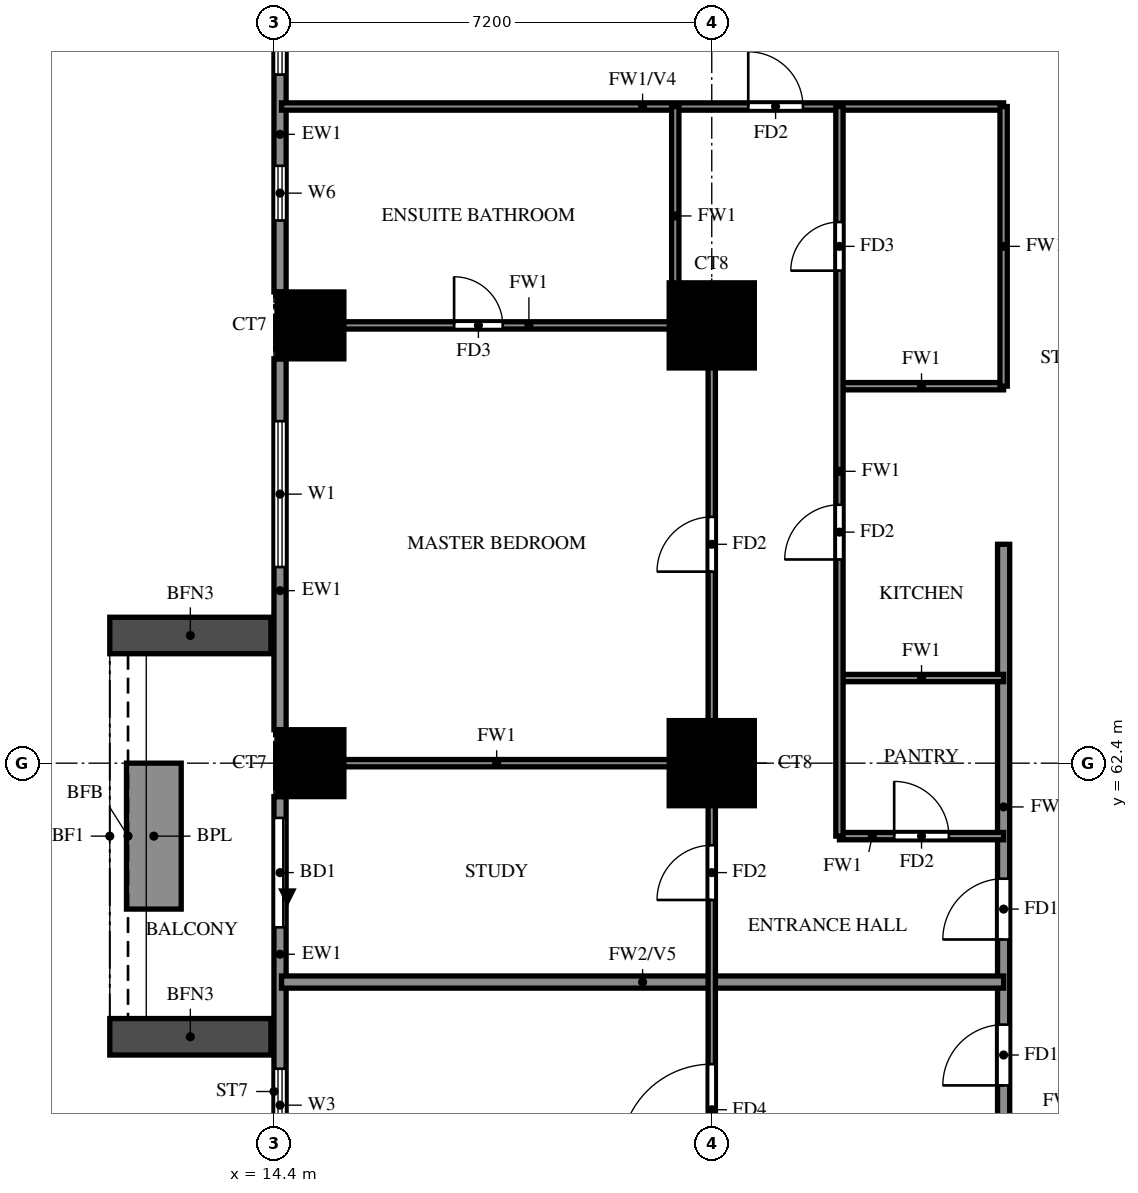
"""IFC4 building model, lengths in metres.
Left out: names, types, materials, properties, quantities, classifications, styles, units other than length and angle.
Written with IfcOpenShell. Run it as: python <this file> out.ifc"""

import sys

from ifc_helpers import new_model, si_unit, direction, frame, frame_2d, origin, origin_2d, place, context, subcontext, project, spatial, rectangle, extrude, source, transform, mapped, element, fill, save


model = new_model("IFC4")
c1 = context("Model", 3, precision=1e-05, world=origin(), true_north=direction((0.0, 1.0)))
c2 = subcontext(c1, "Body", "Model", "MODEL_VIEW")
j1 = project(units=[si_unit("LENGTHUNIT", "METRE"), si_unit("PLANEANGLEUNIT", "RADIAN")], contexts=[c1])
p1 = place(None, origin())
s1 = spatial("IfcSite", under=j1, at=p1, CompositionType="ELEMENT")
p2 = place(p1, origin())
s2 = spatial("IfcBuilding", under=s1, at=p2, CompositionType="ELEMENT")
p3 = place(p2, frame((0.0, 0.0, 44.5)))
s3 = spatial("IfcBuildingStorey", under=s2, at=p3, CompositionType="ELEMENT", Elevation=44.5)
m1 = source(origin(), c2, "Body", "SweptSolid", [
    extrude(rectangle(XDim=1.1, YDim=1.1, at=origin_2d()), origin(), (0.0, 0.0, 1.0), 3.18),
])
p4 = place(p3, frame((15.0, 62.4, 0.0), z_axis=(0.0, 0.0, 1.0), x_axis=(1.0, 0.0, 0.0)))
e1 = element("IfcColumn", 1, at=p4, inside=s3, PredefinedType="COLUMN", context=c2, shape_type="MappedRepresentation", body=[
    mapped(m1, transform((0.0, 0.0, 0.0))),
])
m2 = source(origin(), c2, "Body", "SweptSolid", [
    extrude(rectangle(XDim=1.4, YDim=1.4, at=origin_2d()), origin(), (0.0, 0.0, 1.0), 3.18),
])
p5 = place(p3, frame((21.6, 62.4, 0.0), z_axis=(0.0, 0.0, 1.0), x_axis=(1.0, 0.0, 0.0)))
e2 = element("IfcColumn", 2, at=p5, inside=s3, PredefinedType="COLUMN", context=c2, shape_type="MappedRepresentation", body=[
    mapped(m2, transform((0.0, 0.0, 0.0))),
])
p6 = place(p3, frame((15.0, 69.6, 0.0), z_axis=(0.0, 0.0, 1.0), x_axis=(1.0, 0.0, 0.0)))
e3 = element("IfcColumn", 3, at=p6, inside=s3, PredefinedType="COLUMN", context=c2, shape_type="MappedRepresentation", body=[
    mapped(m1, transform((0.0, 0.0, 0.0))),
])
p7 = place(p3, frame((21.6, 69.6, 0.0), z_axis=(0.0, 0.0, 1.0), x_axis=(1.0, 0.0, 0.0)))
e4 = element("IfcColumn", 4, at=p7, inside=s3, PredefinedType="COLUMN", context=c2, shape_type="MappedRepresentation", body=[
    mapped(m2, transform((0.0, 0.0, 0.0))),
])
p8 = place(p3, frame((14.5, 76.25, 0.0), z_axis=(0.0, 0.0, 1.0), x_axis=(0.0, -1.0, 0.0)))
e5 = element("IfcWall", 5, at=p8, inside=s3, PredefinedType="SOLIDWALL", context=c2, shape_type="SweptSolid", body=[
    extrude(rectangle(XDim=6.1, YDim=0.2, at=frame_2d((3.05, 0.0))), origin(), (0.0, 0.0, 1.0), 3.18),
])
p9 = place(p8, frame((4.025, 0.0, 1.5)))
e6 = element("IfcOpeningElement", 6, at=p9, cuts=e5, PredefinedType="OPENING", context=c2, shape_type="SweptSolid", body=[
    extrude(rectangle(XDim=0.9, YDim=0.9, at=frame_2d((0.45, 0.45))), frame((0.0, 0.11, 0.0), z_axis=(0.0, -1.0, 0.0), x_axis=(1.0, 0.0, 0.0)), (0.0, 0.0, 1.0), 0.22),
])
p10 = place(p8, frame((0.725, 0.0, 0.6)))
e7 = element("IfcOpeningElement", 7, at=p10, cuts=e5, PredefinedType="OPENING", context=c2, shape_type="SweptSolid", body=[
    extrude(rectangle(XDim=1.8, YDim=2.4, at=frame_2d((0.9, 1.2))), frame((0.0, 0.11, 0.0), z_axis=(0.0, -1.0, 0.0), x_axis=(1.0, 0.0, 0.0)), (0.0, 0.0, 1.0), 0.22),
])
p11 = place(p3, frame((14.5, 69.05, 0.0), z_axis=(0.0, 0.0, 1.0), x_axis=(0.0, -1.0, 0.0)))
e8 = element("IfcWall", 8, at=p11, inside=s3, PredefinedType="SOLIDWALL", context=c2, shape_type="SweptSolid", body=[
    extrude(rectangle(XDim=6.1, YDim=0.2, at=frame_2d((3.05, 0.0))), origin(), (0.0, 0.0, 1.0), 3.18),
])
p12 = place(p11, frame((1.025, 0.0, 0.6)))
e9 = element("IfcOpeningElement", 9, at=p12, cuts=e8, PredefinedType="OPENING", context=c2, shape_type="SweptSolid", body=[
    extrude(rectangle(XDim=2.4, YDim=2.4, at=frame_2d((1.2, 1.2))), frame((0.0, 0.11, 0.0), z_axis=(0.0, -1.0, 0.0), x_axis=(1.0, 0.0, 0.0)), (0.0, 0.0, 1.0), 0.22),
])
p13 = place(p3, frame((14.5, 61.85, 0.0), z_axis=(0.0, 0.0, 1.0), x_axis=(0.0, -1.0, 0.0)))
e10 = element("IfcWall", 10, at=p13, inside=s3, PredefinedType="SOLIDWALL", context=c2, shape_type="SweptSolid", body=[
    extrude(rectangle(XDim=6.1, YDim=0.2, at=frame_2d((3.05, 0.0))), origin(), (0.0, 0.0, 1.0), 3.18),
])
p14 = place(p13, frame((0.35, 0.0, 0.0)))
e11 = element("IfcOpeningElement", 11, at=p14, cuts=e10, PredefinedType="OPENING", context=c2, shape_type="SweptSolid", body=[
    extrude(rectangle(XDim=1.8, YDim=2.4, at=frame_2d((0.9, 1.2))), frame((0.0, 0.11, 0.0), z_axis=(0.0, -1.0, 0.0), x_axis=(1.0, 0.0, 0.0)), (0.0, 0.0, 1.0), 0.22),
])
p15 = place(p13, frame((4.475, 0.0, 0.6)))
e12 = element("IfcOpeningElement", 12, at=p15, cuts=e10, PredefinedType="OPENING", context=c2, shape_type="SweptSolid", body=[
    extrude(rectangle(XDim=1.2, YDim=2.4, at=frame_2d((0.6, 1.2))), frame((0.0, 0.11, 0.0), z_axis=(0.0, -1.0, 0.0), x_axis=(1.0, 0.0, 0.0)), (0.0, 0.0, 1.0), 0.22),
])
for number, where, z_axis, x_axis in (
    (13, (14.35, 64.5, 0.0), (0.0, 0.0, 1.0), (-1.0, 0.0, 0.0)),
    (14, (14.35, 57.9, 0.0), (0.0, 0.0, 1.0), (-1.0, 0.0, 0.0)),
):
    element("IfcWall", number, at=place(p3, frame(where, z_axis=z_axis, x_axis=x_axis)), inside=s3, PredefinedType="SOLIDWALL", context=c2, shape_type="SweptSolid", body=[
        extrude(rectangle(XDim=2.65, YDim=0.6, at=frame_2d((1.325, 0.0))), origin(), (0.0, 0.0, 1.0), 2.85),
    ])
p16 = place(p3, frame((12.425, 62.4, 0.0), z_axis=(0.0, 0.0, 1.0), x_axis=(0.0, -1.0, 0.0)))
e15 = element("IfcWall", 15, at=p16, inside=s3, PredefinedType="SOLIDWALL", context=c2, shape_type="SweptSolid", body=[
    extrude(rectangle(XDim=2.4, YDim=0.9, at=frame_2d((1.2, 0.0))), origin(), (0.0, 0.0, 1.0), 0.9),
])
p17 = place(p3, frame((26.4, 56.4, 0.0), z_axis=(0.0, 0.0, 1.0), x_axis=(0.0, 1.0, 0.0)))
e16 = element("IfcWall", 16, at=p17, inside=s3, PredefinedType="SOLIDWALL", context=c2, shape_type="SweptSolid", body=[
    extrude(rectangle(XDim=9.6, YDim=0.2, at=frame_2d((4.8, 0.0))), origin(), (0.0, 0.0, 1.0), 3.18),
])
p18 = place(p17, frame((0.7, 0.0, 0.0)))
e17 = element("IfcOpeningElement", 17, at=p18, cuts=e16, PredefinedType="OPENING", context=c2, shape_type="SweptSolid", body=[
    extrude(rectangle(XDim=1.0, YDim=2.1, at=frame_2d((0.5, 1.05))), frame((0.0, 0.11, 0.0), z_axis=(0.0, -1.0, 0.0), x_axis=(1.0, 0.0, 0.0)), (0.0, 0.0, 1.0), 0.22),
])
p19 = place(p17, frame((3.1, 0.0, 0.0)))
e18 = element("IfcOpeningElement", 18, at=p19, cuts=e16, PredefinedType="OPENING", context=c2, shape_type="SweptSolid", body=[
    extrude(rectangle(XDim=1.0, YDim=2.1, at=frame_2d((0.5, 1.05))), frame((0.0, 0.11, 0.0), z_axis=(0.0, -1.0, 0.0), x_axis=(1.0, 0.0, 0.0)), (0.0, 0.0, 1.0), 0.22),
])
p20 = place(p3, frame((14.525, 58.8, 0.0), z_axis=(0.0, 0.0, 1.0), x_axis=(1.0, 0.0, 0.0)))
e19 = element("IfcWall", 19, at=p20, inside=s3, PredefinedType="SOLIDWALL", context=c2, shape_type="SweptSolid", body=[
    extrude(rectangle(XDim=11.875, YDim=0.2, at=frame_2d((5.938, 0.0))), origin(), (0.0, 0.0, 1.0), 2.28),
])
p21 = place(p3, frame((23.7, 61.2, 0.0), z_axis=(0.0, 0.0, 1.0), x_axis=(1.0, 0.0, 0.0)))
e20 = element("IfcWall", 20, at=p21, inside=s3, PredefinedType="PARTITIONING", context=c2, shape_type="SweptSolid", body=[
    extrude(rectangle(XDim=2.7, YDim=0.12, at=frame_2d((1.35, 0.0))), origin(), (0.0, 0.0, 1.0), 3.18),
])
p22 = place(p21, frame((0.9, 0.0, 0.0)))
e21 = element("IfcOpeningElement", 21, at=p22, cuts=e20, PredefinedType="OPENING", context=c2, shape_type="SweptSolid", body=[
    extrude(rectangle(XDim=0.9, YDim=2.1, at=frame_2d((0.45, 1.05))), frame((0.0, 0.07, 0.0), z_axis=(0.0, -1.0, 0.0), x_axis=(1.0, 0.0, 0.0)), (0.0, 0.0, 1.0), 0.14),
])
p23 = place(p3, frame((14.525, 62.4, 0.0), z_axis=(0.0, 0.0, 1.0), x_axis=(1.0, 0.0, 0.0)))
e22 = element("IfcWall", 22, at=p23, inside=s3, PredefinedType="PARTITIONING", context=c2, shape_type="SweptSolid", body=[
    extrude(rectangle(XDim=7.075, YDim=0.12, at=frame_2d((3.538, 0.0))), origin(), (0.0, 0.0, 1.0), 3.18),
])
for number, where, z_axis, x_axis in (
    (23, (23.7, 63.8, 0.0), (0.0, 0.0, 1.0), (1.0, 0.0, 0.0)),
    (24, (23.7, 68.6, 0.0), (0.0, 0.0, 1.0), (1.0, 0.0, 0.0)),
):
    element("IfcWall", number, at=place(p3, frame(where, z_axis=z_axis, x_axis=x_axis)), inside=s3, PredefinedType="PARTITIONING", context=c2, shape_type="SweptSolid", body=[
        extrude(rectangle(XDim=2.7, YDim=0.12, at=frame_2d((1.35, 0.0))), origin(), (0.0, 0.0, 1.0), 3.18),
    ])
p24 = place(p3, frame((14.525, 69.6, 0.0), z_axis=(0.0, 0.0, 1.0), x_axis=(1.0, 0.0, 0.0)))
e25 = element("IfcWall", 25, at=p24, inside=s3, PredefinedType="PARTITIONING", context=c2, shape_type="SweptSolid", body=[
    extrude(rectangle(XDim=7.075, YDim=0.12, at=frame_2d((3.538, 0.0))), origin(), (0.0, 0.0, 1.0), 3.18),
])
p25 = place(p24, frame((2.837, 0.0, 0.0)))
e26 = element("IfcOpeningElement", 26, at=p25, cuts=e25, PredefinedType="OPENING", context=c2, shape_type="SweptSolid", body=[
    extrude(rectangle(XDim=0.8, YDim=2.1, at=frame_2d((0.4, 1.05))), frame((0.0, 0.07, 0.0), z_axis=(0.0, -1.0, 0.0), x_axis=(1.0, 0.0, 0.0)), (0.0, 0.0, 1.0), 0.14),
])
p26 = place(p3, frame((14.525, 73.2, 0.0), z_axis=(0.0, 0.0, 1.0), x_axis=(1.0, 0.0, 0.0)))
e27 = element("IfcWall", 27, at=p26, inside=s3, PredefinedType="PARTITIONING", context=c2, shape_type="SweptSolid", body=[
    extrude(rectangle(XDim=11.875, YDim=0.12, at=frame_2d((5.938, 0.0))), origin(), (0.0, 0.0, 1.0), 2.28),
])
p27 = place(p26, frame((7.675, 0.0, 0.0)))
e28 = element("IfcOpeningElement", 28, at=p27, cuts=e27, PredefinedType="OPENING", context=c2, shape_type="SweptSolid", body=[
    extrude(rectangle(XDim=0.9, YDim=2.1, at=frame_2d((0.45, 1.05))), frame((0.0, 0.07, 0.0), z_axis=(0.0, -1.0, 0.0), x_axis=(1.0, 0.0, 0.0)), (0.0, 0.0, 1.0), 0.14),
])
p28 = place(p3, frame((21.0, 69.6, 0.0), z_axis=(0.0, 0.0, 1.0), x_axis=(0.0, 1.0, 0.0)))
e29 = element("IfcWall", 29, at=p28, inside=s3, PredefinedType="PARTITIONING", context=c2, shape_type="SweptSolid", body=[
    extrude(rectangle(XDim=3.6, YDim=0.12, at=frame_2d((1.8, 0.0))), origin(), (0.0, 0.0, 1.0), 3.18),
])
p29 = place(p3, frame((21.6, 33.725, 0.0), z_axis=(0.0, 0.0, 1.0), x_axis=(0.0, 1.0, 0.0)))
e30 = element("IfcWall", 30, at=p29, inside=s3, PredefinedType="PARTITIONING", context=c2, shape_type="SweptSolid", body=[
    extrude(rectangle(XDim=35.875, YDim=0.12, at=frame_2d((17.938, 0.0))), origin(), (0.0, 0.0, 1.0), 3.18),
])
p30 = place(p29, frame((7.775, 0.0, 0.0)))
e31 = element("IfcOpeningElement", 31, at=p30, cuts=e30, PredefinedType="OPENING", context=c2, shape_type="SweptSolid", body=[
    extrude(rectangle(XDim=0.9, YDim=2.1, at=frame_2d((0.45, 1.05))), frame((0.0, 0.07, 0.0), z_axis=(0.0, -1.0, 0.0), x_axis=(1.0, 0.0, 0.0)), (0.0, 0.0, 1.0), 0.14),
])
p31 = place(p29, frame((15.625, 0.0, 0.0)))
e32 = element("IfcOpeningElement", 32, at=p31, cuts=e30, PredefinedType="OPENING", context=c2, shape_type="SweptSolid", body=[
    extrude(rectangle(XDim=0.9, YDim=2.1, at=frame_2d((0.45, 1.05))), frame((0.0, 0.07, 0.0), z_axis=(0.0, -1.0, 0.0), x_axis=(1.0, 0.0, 0.0)), (0.0, 0.0, 1.0), 0.14),
])
p32 = place(p29, frame((22.225, 0.0, 0.0)))
e33 = element("IfcOpeningElement", 33, at=p32, cuts=e30, PredefinedType="OPENING", context=c2, shape_type="SweptSolid", body=[
    extrude(rectangle(XDim=1.5, YDim=2.1, at=frame_2d((0.75, 1.05))), frame((0.0, 0.07, 0.0), z_axis=(0.0, -1.0, 0.0), x_axis=(1.0, 0.0, 0.0)), (0.0, 0.0, 1.0), 0.14),
])
p33 = place(p29, frame((26.425, 0.0, 0.0)))
e34 = element("IfcOpeningElement", 34, at=p33, cuts=e30, PredefinedType="OPENING", context=c2, shape_type="SweptSolid", body=[
    extrude(rectangle(XDim=0.9, YDim=2.1, at=frame_2d((0.45, 1.05))), frame((0.0, 0.07, 0.0), z_axis=(0.0, -1.0, 0.0), x_axis=(1.0, 0.0, 0.0)), (0.0, 0.0, 1.0), 0.14),
])
p34 = place(p29, frame((31.825, 0.0, 0.0)))
e35 = element("IfcOpeningElement", 35, at=p34, cuts=e30, PredefinedType="OPENING", context=c2, shape_type="SweptSolid", body=[
    extrude(rectangle(XDim=0.9, YDim=2.1, at=frame_2d((0.45, 1.05))), frame((0.0, 0.07, 0.0), z_axis=(0.0, -1.0, 0.0), x_axis=(1.0, 0.0, 0.0)), (0.0, 0.0, 1.0), 0.14),
])
p35 = place(p3, frame((23.7, 61.2, 0.0), z_axis=(0.0, 0.0, 1.0), x_axis=(0.0, 1.0, 0.0)))
e36 = element("IfcWall", 36, at=p35, inside=s3, PredefinedType="PARTITIONING", context=c2, shape_type="SweptSolid", body=[
    extrude(rectangle(XDim=12.0, YDim=0.12, at=frame_2d((6.0, 0.0))), origin(), (0.0, 0.0, 1.0), 3.18),
])
p36 = place(p35, frame((4.55, 0.0, 0.0)))
e37 = element("IfcOpeningElement", 37, at=p36, cuts=e36, PredefinedType="OPENING", context=c2, shape_type="SweptSolid", body=[
    extrude(rectangle(XDim=0.9, YDim=2.1, at=frame_2d((0.45, 1.05))), frame((0.0, 0.07, 0.0), z_axis=(0.0, -1.0, 0.0), x_axis=(1.0, 0.0, 0.0)), (0.0, 0.0, 1.0), 0.14),
])
p37 = place(p35, frame((9.3, 0.0, 0.0)))
e38 = element("IfcOpeningElement", 38, at=p37, cuts=e36, PredefinedType="OPENING", context=c2, shape_type="SweptSolid", body=[
    extrude(rectangle(XDim=0.8, YDim=2.1, at=frame_2d((0.4, 1.05))), frame((0.0, 0.07, 0.0), z_axis=(0.0, -1.0, 0.0), x_axis=(1.0, 0.0, 0.0)), (0.0, 0.0, 1.0), 0.14),
])
p38 = place(p3, frame((26.4, 68.6, 0.0), z_axis=(0.0, 0.0, 1.0), x_axis=(0.0, 1.0, 0.0)))
e39 = element("IfcWall", 39, at=p38, inside=s3, PredefinedType="PARTITIONING", context=c2, shape_type="SweptSolid", body=[
    extrude(rectangle(XDim=4.6, YDim=0.12, at=frame_2d((2.3, 0.0))), origin(), (0.0, 0.0, 1.0), 3.18),
])
p39 = place(p9, origin())
e40 = element("IfcWindow", 40, at=p39, inside=s3, PartitioningType="SINGLE_PANEL", PredefinedType="WINDOW", context=c2, shape_type="SweptSolid", body=[
    extrude(rectangle(XDim=0.9, YDim=0.9, at=frame_2d((0.45, 0.45))), frame((0.0, 0.03, 0.0), z_axis=(0.0, -1.0, 0.0), x_axis=(1.0, 0.0, 0.0)), (0.0, 0.0, 1.0), 0.06),
])
fill(e6, e40)
p40 = place(p10, origin())
e41 = element("IfcWindow", 41, at=p40, inside=s3, PartitioningType="DOUBLE_PANEL_VERTICAL", PredefinedType="WINDOW", context=c2, shape_type="SweptSolid", body=[
    extrude(rectangle(XDim=1.8, YDim=2.4, at=frame_2d((0.9, 1.2))), frame((0.0, 0.03, 0.0), z_axis=(0.0, -1.0, 0.0), x_axis=(1.0, 0.0, 0.0)), (0.0, 0.0, 1.0), 0.06),
])
fill(e7, e41)
p41 = place(p12, origin())
e42 = element("IfcWindow", 42, at=p41, inside=s3, PartitioningType="DOUBLE_PANEL_VERTICAL", PredefinedType="WINDOW", context=c2, shape_type="SweptSolid", body=[
    extrude(rectangle(XDim=2.4, YDim=2.4, at=frame_2d((1.2, 1.2))), frame((0.0, 0.03, 0.0), z_axis=(0.0, -1.0, 0.0), x_axis=(1.0, 0.0, 0.0)), (0.0, 0.0, 1.0), 0.06),
])
fill(e9, e42)
p42 = place(p14, origin())
e43 = element("IfcDoor", 43, at=p42, inside=s3, OperationType="DOUBLE_DOOR_SLIDING", PredefinedType="DOOR", context=c2, shape_type="SweptSolid", body=[
    extrude(rectangle(XDim=1.8, YDim=2.4, at=frame_2d((0.9, 1.2))), frame((0.0, 0.025, 0.0), z_axis=(0.0, -1.0, 0.0), x_axis=(1.0, 0.0, 0.0)), (0.0, 0.0, 1.0), 0.05),
])
fill(e11, e43)
p43 = place(p15, origin())
e44 = element("IfcWindow", 44, at=p43, inside=s3, PartitioningType="SINGLE_PANEL", PredefinedType="WINDOW", context=c2, shape_type="SweptSolid", body=[
    extrude(rectangle(XDim=1.2, YDim=2.4, at=frame_2d((0.6, 1.2))), frame((0.0, 0.03, 0.0), z_axis=(0.0, -1.0, 0.0), x_axis=(1.0, 0.0, 0.0)), (0.0, 0.0, 1.0), 0.06),
])
fill(e12, e44)
p44 = place(p18, origin())
e45 = element("IfcDoor", 45, at=p44, inside=s3, OperationType="SINGLE_SWING_LEFT", PredefinedType="DOOR", context=c2, shape_type="SweptSolid", body=[
    extrude(rectangle(XDim=1.0, YDim=2.1, at=frame_2d((0.5, 1.05))), frame((0.0, 0.025, 0.0), z_axis=(0.0, -1.0, 0.0), x_axis=(1.0, 0.0, 0.0)), (0.0, 0.0, 1.0), 0.05),
])
fill(e17, e45)
p45 = place(p32, origin())
e46 = element("IfcDoor", 46, at=p45, inside=s3, OperationType="SINGLE_SWING_LEFT", PredefinedType="DOOR", context=c2, shape_type="SweptSolid", body=[
    extrude(rectangle(XDim=1.5, YDim=2.1, at=frame_2d((0.75, 1.05))), frame((0.0, 0.025, 0.0), z_axis=(0.0, -1.0, 0.0), x_axis=(1.0, 0.0, 0.0)), (0.0, 0.0, 1.0), 0.05),
])
fill(e33, e46)
p46 = place(p19, origin())
e47 = element("IfcDoor", 47, at=p46, inside=s3, OperationType="SINGLE_SWING_RIGHT", PredefinedType="DOOR", context=c2, shape_type="SweptSolid", body=[
    extrude(rectangle(XDim=1.0, YDim=2.1, at=frame_2d((0.5, 1.05))), frame((0.0, 0.025, 0.0), z_axis=(0.0, -1.0, 0.0), x_axis=(1.0, 0.0, 0.0)), (0.0, 0.0, 1.0), 0.05),
])
fill(e18, e47)
p47 = place(p33, origin())
e48 = element("IfcDoor", 48, at=p47, inside=s3, OperationType="SINGLE_SWING_LEFT", PredefinedType="DOOR", context=c2, shape_type="SweptSolid", body=[
    extrude(rectangle(XDim=0.9, YDim=2.1, at=frame_2d((0.45, 1.05))), frame((0.0, 0.025, 0.0), z_axis=(0.0, -1.0, 0.0), x_axis=(1.0, 0.0, 0.0)), (0.0, 0.0, 1.0), 0.05),
])
fill(e34, e48)
p48 = place(p34, origin())
e49 = element("IfcDoor", 49, at=p48, inside=s3, OperationType="SINGLE_SWING_LEFT", PredefinedType="DOOR", context=c2, shape_type="SweptSolid", body=[
    extrude(rectangle(XDim=0.9, YDim=2.1, at=frame_2d((0.45, 1.05))), frame((0.0, 0.025, 0.0), z_axis=(0.0, -1.0, 0.0), x_axis=(1.0, 0.0, 0.0)), (0.0, 0.0, 1.0), 0.05),
])
fill(e35, e49)
p49 = place(p25, origin())
e50 = element("IfcDoor", 50, at=p49, inside=s3, OperationType="SINGLE_SWING_RIGHT", PredefinedType="DOOR", context=c2, shape_type="SweptSolid", body=[
    extrude(rectangle(XDim=0.8, YDim=2.1, at=frame_2d((0.4, 1.05))), frame((0.0, 0.025, 0.0), z_axis=(0.0, -1.0, 0.0), x_axis=(1.0, 0.0, 0.0)), (0.0, 0.0, 1.0), 0.05),
])
fill(e26, e50)
p50 = place(p27, origin())
e51 = element("IfcDoor", 51, at=p50, inside=s3, OperationType="SINGLE_SWING_LEFT", PredefinedType="DOOR", context=c2, shape_type="SweptSolid", body=[
    extrude(rectangle(XDim=0.9, YDim=2.1, at=frame_2d((0.45, 1.05))), frame((0.0, 0.025, 0.0), z_axis=(0.0, -1.0, 0.0), x_axis=(1.0, 0.0, 0.0)), (0.0, 0.0, 1.0), 0.05),
])
fill(e28, e51)
p51 = place(p22, origin())
e52 = element("IfcDoor", 52, at=p51, inside=s3, OperationType="SINGLE_SWING_LEFT", PredefinedType="DOOR", context=c2, shape_type="SweptSolid", body=[
    extrude(rectangle(XDim=0.9, YDim=2.1, at=frame_2d((0.45, 1.05))), frame((0.0, 0.025, 0.0), z_axis=(0.0, -1.0, 0.0), x_axis=(1.0, 0.0, 0.0)), (0.0, 0.0, 1.0), 0.05),
])
fill(e21, e52)
p52 = place(p36, origin())
e53 = element("IfcDoor", 53, at=p52, inside=s3, OperationType="SINGLE_SWING_RIGHT", PredefinedType="DOOR", context=c2, shape_type="SweptSolid", body=[
    extrude(rectangle(XDim=0.9, YDim=2.1, at=frame_2d((0.45, 1.05))), frame((0.0, 0.025, 0.0), z_axis=(0.0, -1.0, 0.0), x_axis=(1.0, 0.0, 0.0)), (0.0, 0.0, 1.0), 0.05),
])
fill(e37, e53)
p53 = place(p37, origin())
e54 = element("IfcDoor", 54, at=p53, inside=s3, OperationType="SINGLE_SWING_LEFT", PredefinedType="DOOR", context=c2, shape_type="SweptSolid", body=[
    extrude(rectangle(XDim=0.8, YDim=2.1, at=frame_2d((0.4, 1.05))), frame((0.0, 0.025, 0.0), z_axis=(0.0, -1.0, 0.0), x_axis=(1.0, 0.0, 0.0)), (0.0, 0.0, 1.0), 0.05),
])
fill(e38, e54)
save(model, sys.argv[1])
